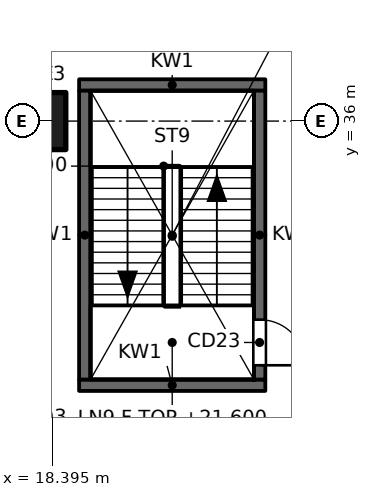
"""IFC4 building model, lengths in metres.
Left out: names, types, materials, properties, quantities, classifications, styles, units other than length and angle.
Written with IfcOpenShell. Run it as: python <this file> out.ifc"""

import sys

from ifc_helpers import new_model, si_unit, direction, frame, frame_2d, origin, origin_2d, place, context, subcontext, project, spatial, rectangle, extrude, element, fill, save


model = new_model("IFC4")
c1 = context("Model", 3, precision=1e-05, world=origin(), true_north=direction((0.0, 1.0)))
c2 = subcontext(c1, "Body", "Model", "MODEL_VIEW")
j1 = project(units=[si_unit("LENGTHUNIT", "METRE"), si_unit("PLANEANGLEUNIT", "RADIAN")], contexts=[c1])
p1 = place(None, origin())
s1 = spatial("IfcSite", under=j1, at=p1, CompositionType="ELEMENT")
p2 = place(p1, origin())
s2 = spatial("IfcBuilding", under=s1, at=p2, CompositionType="ELEMENT")
p3 = place(p2, frame((0.0, 0.0, 21.6)))
s3 = spatial("IfcBuildingStorey", under=s2, at=p3, CompositionType="ELEMENT", Elevation=21.6)
p4 = place(p3, frame((18.0, 36.0, 0.0), z_axis=(0.0, 0.0, 1.0), x_axis=(1.0, 0.0, 0.0)))
e1 = element("IfcColumn", 1, at=p4, inside=s3, PredefinedType="COLUMN", context=c2, shape_type="SweptSolid", body=[
    extrude(rectangle(XDim=1.5, YDim=1.5, at=origin_2d()), origin(), (0.0, 0.0, 1.0), 4.8),
])
for number, where, z_axis, x_axis in (
    (2, (19.1, 29.05, -0.35), (0.0, 0.0, 1.0), (1.0, 0.0, 0.0)),
    (3, (19.1, 36.95, -0.35), (0.0, 0.0, 1.0), (1.0, 0.0, 0.0)),
):
    element("IfcWall", number, at=place(p3, frame(where, z_axis=z_axis, x_axis=x_axis)), inside=s3, PredefinedType="SOLIDWALL", context=c2, shape_type="SweptSolid", body=[
        extrude(rectangle(XDim=4.9, YDim=0.3, at=frame_2d((2.45, 0.0))), origin(), (0.0, 0.0, 1.0), 4.8),
    ])
p5 = place(p3, frame((19.25, 29.2, -0.35), z_axis=(0.0, 0.0, 1.0), x_axis=(0.0, 1.0, 0.0)))
e4 = element("IfcWall", 4, at=p5, inside=s3, PredefinedType="SOLIDWALL", context=c2, shape_type="SweptSolid", body=[
    extrude(rectangle(XDim=7.6, YDim=0.3, at=frame_2d((3.8, 0.0))), origin(), (0.0, 0.0, 1.0), 4.8),
])
p6 = place(p3, frame((23.85, 29.2, -0.35), z_axis=(0.0, 0.0, 1.0), x_axis=(0.0, 1.0, 0.0)))
e5 = element("IfcWall", 5, at=p6, inside=s3, PredefinedType="SOLIDWALL", context=c2, shape_type="SweptSolid", body=[
    extrude(rectangle(XDim=7.6, YDim=0.3, at=frame_2d((3.8, 0.0))), origin(), (0.0, 0.0, 1.0), 4.8),
])
p7 = place(p6, frame((0.375, 0.0, 0.35)))
e6 = element("IfcOpeningElement", 6, at=p7, cuts=e5, PredefinedType="OPENING", context=c2, shape_type="SweptSolid", body=[
    extrude(rectangle(XDim=1.2, YDim=2.1, at=frame_2d((0.6, 1.05))), frame((0.0, 0.15, 0.0), z_axis=(0.0, -1.0, 0.0), x_axis=(1.0, 0.0, 0.0)), (0.0, 0.0, 1.0), 0.3),
])
p8 = place(p7, frame((1.2, 0.0, 0.0), z_axis=(0.0, 0.0, 1.0), x_axis=(-1.0, 0.0, 0.0)))
e7 = element("IfcDoor", 7, at=p8, inside=s3, OperationType="SINGLE_SWING_RIGHT", PredefinedType="DOOR", context=c2, shape_type="SweptSolid", body=[
    extrude(rectangle(XDim=1.2, YDim=2.1, at=frame_2d((0.6, 1.05))), frame((0.0, 0.025, 0.0), z_axis=(0.0, -1.0, 0.0), x_axis=(1.0, 0.0, 0.0)), (0.0, 0.0, 1.0), 0.05),
])
fill(e6, e7)
save(model, sys.argv[1])
